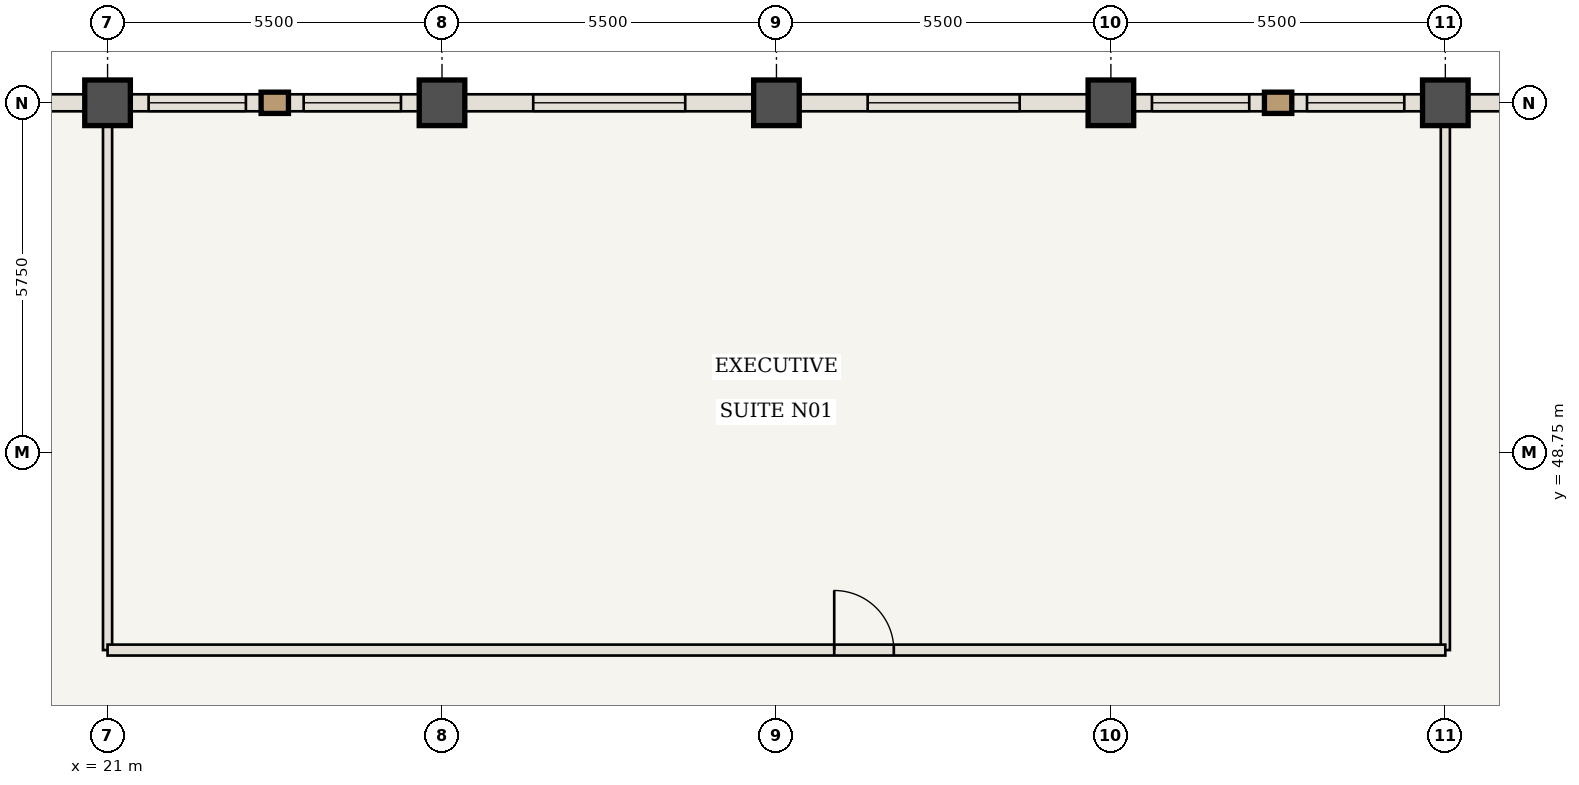
"""IFC4 building model, lengths in metres.
Left out: names, types, materials, properties, quantities, classifications, styles, units other than length and angle.
Written with IfcOpenShell. Run it as: python <this file> out.ifc"""

import sys

from ifc_helpers import new_model, si_unit, direction, frame, frame_2d, origin, origin_2d, place, context, subcontext, project, spatial, rectangle, extrude, element, fill, save


model = new_model("IFC4")
c1 = context("Model", 3, precision=1e-05, world=origin(), true_north=direction((0.0, 1.0)))
c2 = subcontext(c1, "Body", "Model", "MODEL_VIEW")
j1 = project(units=[si_unit("LENGTHUNIT", "METRE"), si_unit("PLANEANGLEUNIT", "RADIAN")], contexts=[c1])
p1 = place(None, origin())
s1 = spatial("IfcSite", under=j1, at=p1, CompositionType="ELEMENT")
p2 = place(p1, origin())
s2 = spatial("IfcBuilding", under=s1, at=p2, CompositionType="ELEMENT")
p3 = place(p2, frame((0.0, 0.0, 304.5)))
s3 = spatial("IfcBuildingStorey", under=s2, at=p3, CompositionType="ELEMENT", Elevation=304.5)
for number, where, z_axis, x_axis in (
    (1, (21.0, 54.5, 0.0), (0.0, 0.0, 1.0), (1.0, 0.0, 0.0)),
    (2, (26.5, 54.5, 0.0), (0.0, 0.0, 1.0), (1.0, 0.0, 0.0)),
    (3, (32.0, 54.5, 0.0), (0.0, 0.0, 1.0), (1.0, 0.0, 0.0)),
    (4, (37.5, 54.5, 0.0), (0.0, 0.0, 1.0), (1.0, 0.0, 0.0)),
    (5, (43.0, 54.5, 0.0), (0.0, 0.0, 1.0), (1.0, 0.0, 0.0)),
):
    element("IfcColumn", number, at=place(p3, frame(where, z_axis=z_axis, x_axis=x_axis)), inside=s3, PredefinedType="COLUMN", context=c2, shape_type="SweptSolid", body=[
        extrude(rectangle(XDim=0.75, YDim=0.75, at=origin_2d()), origin(), (0.0, 0.0, 1.0), 3.85),
    ])
for number, where, z_axis, x_axis in (
    (6, (21.0, 45.5, 0.0), (0.0, 0.0, 1.0), (0.0, 1.0, 0.0)),
    (7, (43.0, 45.5, 0.0), (0.0, 0.0, 1.0), (0.0, 1.0, 0.0)),
):
    element("IfcWall", number, at=place(p3, frame(where, z_axis=z_axis, x_axis=x_axis)), inside=s3, PredefinedType="STANDARD", context=c2, shape_type="SweptSolid", body=[
        extrude(rectangle(XDim=8.94, YDim=0.15, at=frame_2d((4.47, 0.0))), origin(), (0.0, 0.0, 1.0), 3.63),
    ])
p4 = place(p3, frame((21.0, 45.5, 0.0), z_axis=(0.0, 0.0, 1.0), x_axis=(1.0, 0.0, 0.0)))
e8 = element("IfcWall", 8, at=p4, inside=s3, PredefinedType="STANDARD", context=c2, shape_type="SweptSolid", body=[
    extrude(rectangle(XDim=22.0, YDim=0.18, at=frame_2d((11.0, 0.0))), origin(), (0.0, 0.0, 1.0), 3.63),
])
p5 = place(p4, frame((11.95, 0.0, 0.0)))
e9 = element("IfcOpeningElement", 9, at=p5, cuts=e8, PredefinedType="OPENING", context=c2, shape_type="SweptSolid", body=[
    extrude(rectangle(XDim=0.98, YDim=2.2, at=frame_2d((0.49, 1.1))), frame((0.0, 0.1, 0.0), z_axis=(0.0, -1.0, 0.0), x_axis=(1.0, 0.0, 0.0)), (0.0, 0.0, 1.0), 0.2),
])
p6 = place(p3, frame((15.5, 54.5, 0.0), z_axis=(0.0, 0.0, 1.0), x_axis=(1.0, 0.0, 0.0)))
e10 = element("IfcWall", 10, at=p6, inside=s3, PredefinedType="USERDEFINED", context=c2, shape_type="SweptSolid", body=[
    extrude(rectangle(XDim=5.5, YDim=0.28, at=frame_2d((2.75, 0.0))), origin(), (0.0, 0.0, 1.0), 2.93),
])
p7 = place(p3, frame((21.0, 54.5, 0.0), z_axis=(0.0, 0.0, 1.0), x_axis=(1.0, 0.0, 0.0)))
e11 = element("IfcWall", 11, at=p7, inside=s3, PredefinedType="USERDEFINED", context=c2, shape_type="SweptSolid", body=[
    extrude(rectangle(XDim=5.5, YDim=0.28, at=frame_2d((2.75, 0.0))), origin(), (0.0, 0.0, 1.0), 2.93),
])
p8 = place(p7, frame((0.675, 0.0, 0.85)))
e12 = element("IfcOpeningElement", 12, at=p8, cuts=e11, PredefinedType="OPENING", context=c2, shape_type="SweptSolid", body=[
    extrude(rectangle(XDim=1.6, YDim=1.88, at=frame_2d((0.8, 0.94))), frame((0.0, 0.15, 0.0), z_axis=(0.0, -1.0, 0.0), x_axis=(1.0, 0.0, 0.0)), (0.0, 0.0, 1.0), 0.3),
])
p9 = place(p7, frame((3.225, 0.0, 0.85)))
e13 = element("IfcOpeningElement", 13, at=p9, cuts=e11, PredefinedType="OPENING", context=c2, shape_type="SweptSolid", body=[
    extrude(rectangle(XDim=1.6, YDim=1.88, at=frame_2d((0.8, 0.94))), frame((0.0, 0.15, 0.0), z_axis=(0.0, -1.0, 0.0), x_axis=(1.0, 0.0, 0.0)), (0.0, 0.0, 1.0), 0.3),
])
p10 = place(p3, frame((26.5, 54.5, 0.0), z_axis=(0.0, 0.0, 1.0), x_axis=(1.0, 0.0, 0.0)))
e14 = element("IfcWall", 14, at=p10, inside=s3, PredefinedType="USERDEFINED", context=c2, shape_type="SweptSolid", body=[
    extrude(rectangle(XDim=5.5, YDim=0.28, at=frame_2d((2.75, 0.0))), origin(), (0.0, 0.0, 1.0), 2.93),
])
p11 = place(p10, frame((1.5, 0.0, 0.85)))
e15 = element("IfcOpeningElement", 15, at=p11, cuts=e14, PredefinedType="OPENING", context=c2, shape_type="SweptSolid", body=[
    extrude(rectangle(XDim=2.5, YDim=1.88, at=frame_2d((1.25, 0.94))), frame((0.0, 0.15, 0.0), z_axis=(0.0, -1.0, 0.0), x_axis=(1.0, 0.0, 0.0)), (0.0, 0.0, 1.0), 0.3),
])
p12 = place(p3, frame((32.0, 54.5, 0.0), z_axis=(0.0, 0.0, 1.0), x_axis=(1.0, 0.0, 0.0)))
e16 = element("IfcWall", 16, at=p12, inside=s3, PredefinedType="USERDEFINED", context=c2, shape_type="SweptSolid", body=[
    extrude(rectangle(XDim=5.5, YDim=0.28, at=frame_2d((2.75, 0.0))), origin(), (0.0, 0.0, 1.0), 2.93),
])
p13 = place(p12, frame((1.5, 0.0, 0.85)))
e17 = element("IfcOpeningElement", 17, at=p13, cuts=e16, PredefinedType="OPENING", context=c2, shape_type="SweptSolid", body=[
    extrude(rectangle(XDim=2.5, YDim=1.88, at=frame_2d((1.25, 0.94))), frame((0.0, 0.15, 0.0), z_axis=(0.0, -1.0, 0.0), x_axis=(1.0, 0.0, 0.0)), (0.0, 0.0, 1.0), 0.3),
])
p14 = place(p3, frame((37.5, 54.5, 0.0), z_axis=(0.0, 0.0, 1.0), x_axis=(1.0, 0.0, 0.0)))
e18 = element("IfcWall", 18, at=p14, inside=s3, PredefinedType="USERDEFINED", context=c2, shape_type="SweptSolid", body=[
    extrude(rectangle(XDim=5.5, YDim=0.28, at=frame_2d((2.75, 0.0))), origin(), (0.0, 0.0, 1.0), 2.93),
])
p15 = place(p14, frame((0.675, 0.0, 0.85)))
e19 = element("IfcOpeningElement", 19, at=p15, cuts=e18, PredefinedType="OPENING", context=c2, shape_type="SweptSolid", body=[
    extrude(rectangle(XDim=1.6, YDim=1.88, at=frame_2d((0.8, 0.94))), frame((0.0, 0.15, 0.0), z_axis=(0.0, -1.0, 0.0), x_axis=(1.0, 0.0, 0.0)), (0.0, 0.0, 1.0), 0.3),
])
p16 = place(p14, frame((3.225, 0.0, 0.85)))
e20 = element("IfcOpeningElement", 20, at=p16, cuts=e18, PredefinedType="OPENING", context=c2, shape_type="SweptSolid", body=[
    extrude(rectangle(XDim=1.6, YDim=1.88, at=frame_2d((0.8, 0.94))), frame((0.0, 0.15, 0.0), z_axis=(0.0, -1.0, 0.0), x_axis=(1.0, 0.0, 0.0)), (0.0, 0.0, 1.0), 0.3),
])
p17 = place(p3, frame((43.0, 54.5, 0.0), z_axis=(0.0, 0.0, 1.0), x_axis=(1.0, 0.0, 0.0)))
e21 = element("IfcWall", 21, at=p17, inside=s3, PredefinedType="USERDEFINED", context=c2, shape_type="SweptSolid", body=[
    extrude(rectangle(XDim=5.5, YDim=0.28, at=frame_2d((2.75, 0.0))), origin(), (0.0, 0.0, 1.0), 2.93),
])
p18 = place(p5, origin())
e22 = element("IfcDoor", 22, at=p18, inside=s3, OperationType="SINGLE_SWING_LEFT", PredefinedType="DOOR", context=c2, shape_type="SweptSolid", body=[
    extrude(rectangle(XDim=0.98, YDim=2.2, at=frame_2d((0.49, 1.1))), frame((0.0, 0.025, 0.0), z_axis=(0.0, -1.0, 0.0), x_axis=(1.0, 0.0, 0.0)), (0.0, 0.0, 1.0), 0.05),
])
fill(e9, e22)
p19 = place(p8, origin())
e23 = element("IfcWindow", 23, at=p19, inside=s3, PartitioningType="SINGLE_PANEL", PredefinedType="WINDOW", context=c2, shape_type="SweptSolid", body=[
    extrude(rectangle(XDim=1.6, YDim=1.88, at=frame_2d((0.8, 0.94))), frame((0.0, 0.03, 0.0), z_axis=(0.0, -1.0, 0.0), x_axis=(1.0, 0.0, 0.0)), (0.0, 0.0, 1.0), 0.06),
])
fill(e12, e23)
p20 = place(p9, origin())
e24 = element("IfcWindow", 24, at=p20, inside=s3, PartitioningType="SINGLE_PANEL", PredefinedType="WINDOW", context=c2, shape_type="SweptSolid", body=[
    extrude(rectangle(XDim=1.6, YDim=1.88, at=frame_2d((0.8, 0.94))), frame((0.0, 0.03, 0.0), z_axis=(0.0, -1.0, 0.0), x_axis=(1.0, 0.0, 0.0)), (0.0, 0.0, 1.0), 0.06),
])
fill(e13, e24)
p21 = place(p11, origin())
e25 = element("IfcWindow", 25, at=p21, inside=s3, PartitioningType="SINGLE_PANEL", PredefinedType="WINDOW", context=c2, shape_type="SweptSolid", body=[
    extrude(rectangle(XDim=2.5, YDim=1.88, at=frame_2d((1.25, 0.94))), frame((0.0, 0.03, 0.0), z_axis=(0.0, -1.0, 0.0), x_axis=(1.0, 0.0, 0.0)), (0.0, 0.0, 1.0), 0.06),
])
fill(e15, e25)
p22 = place(p13, origin())
e26 = element("IfcWindow", 26, at=p22, inside=s3, PartitioningType="SINGLE_PANEL", PredefinedType="WINDOW", context=c2, shape_type="SweptSolid", body=[
    extrude(rectangle(XDim=2.5, YDim=1.88, at=frame_2d((1.25, 0.94))), frame((0.0, 0.03, 0.0), z_axis=(0.0, -1.0, 0.0), x_axis=(1.0, 0.0, 0.0)), (0.0, 0.0, 1.0), 0.06),
])
fill(e17, e26)
p23 = place(p15, origin())
e27 = element("IfcWindow", 27, at=p23, inside=s3, PartitioningType="SINGLE_PANEL", PredefinedType="WINDOW", context=c2, shape_type="SweptSolid", body=[
    extrude(rectangle(XDim=1.6, YDim=1.88, at=frame_2d((0.8, 0.94))), frame((0.0, 0.03, 0.0), z_axis=(0.0, -1.0, 0.0), x_axis=(1.0, 0.0, 0.0)), (0.0, 0.0, 1.0), 0.06),
])
fill(e19, e27)
p24 = place(p16, origin())
e28 = element("IfcWindow", 28, at=p24, inside=s3, PartitioningType="SINGLE_PANEL", PredefinedType="WINDOW", context=c2, shape_type="SweptSolid", body=[
    extrude(rectangle(XDim=1.6, YDim=1.88, at=frame_2d((0.8, 0.94))), frame((0.0, 0.03, 0.0), z_axis=(0.0, -1.0, 0.0), x_axis=(1.0, 0.0, 0.0)), (0.0, 0.0, 1.0), 0.06),
])
fill(e20, e28)
save(model, sys.argv[1])
